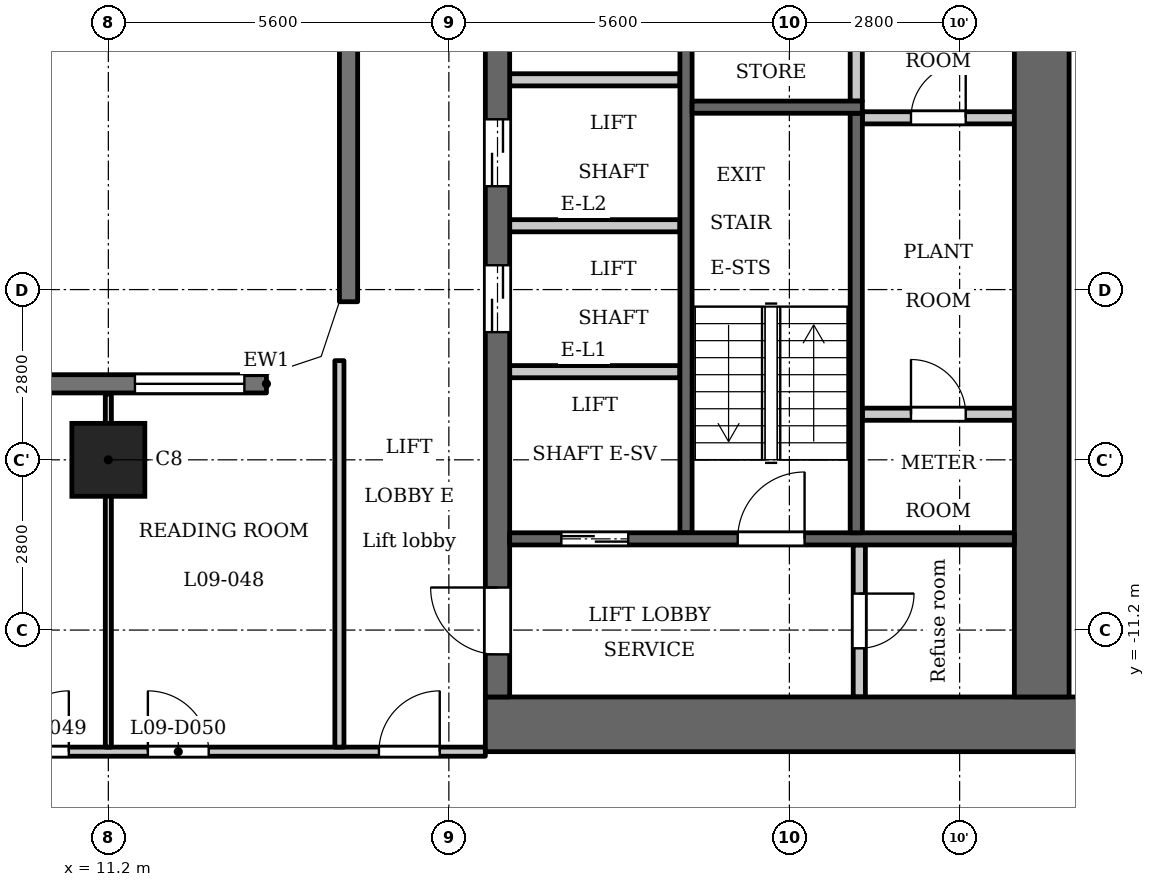
"""IFC4 building model, lengths in metres.
Left out: names, types, materials, properties, quantities, classifications, styles, units other than length and angle.
Written with IfcOpenShell. Run it as: python <this file> out.ifc"""

import sys

from ifc_helpers import new_model, si_unit, direction, frame, frame_2d, origin, origin_2d, place, context, subcontext, project, spatial, polyline, rectangle, outline, extrude, element, fill, save


model = new_model("IFC4")
c1 = context("Model", 3, precision=1e-05, world=origin(), true_north=direction((0.0, 1.0)))
c2 = subcontext(c1, "Body", "Model", "MODEL_VIEW")
j1 = project(units=[si_unit("LENGTHUNIT", "METRE"), si_unit("PLANEANGLEUNIT", "RADIAN")], contexts=[c1])
p1 = place(None, origin())
s1 = spatial("IfcSite", under=j1, at=p1, CompositionType="ELEMENT")
p2 = place(p1, origin())
s2 = spatial("IfcBuilding", under=s1, at=p2, CompositionType="ELEMENT")
p3 = place(p2, frame((0.0, 0.0, 41.0)))
s3 = spatial("IfcBuildingStorey", under=s2, at=p3, CompositionType="ELEMENT", Elevation=41.0)
p4 = place(p3, frame((11.2, -8.4, 0.0), z_axis=(0.0, 0.0, 1.0), x_axis=(1.0, 0.0, 0.0)))
e1 = element("IfcColumn", 1, at=p4, inside=s3, PredefinedType="COLUMN", context=c2, shape_type="SweptSolid", body=[
    extrude(rectangle(XDim=1.2, YDim=1.2, at=origin_2d()), origin(), (0.0, 0.0, 1.0), 3.5),
])
p5 = place(p3, frame((15.15, 5.8, 0.0), z_axis=(0.0, 0.0, 1.0), x_axis=(0.0, -1.0, 0.0)))
e2 = element("IfcWall", 2, at=p5, inside=s3, PredefinedType="SOLIDWALL", context=c2, shape_type="SweptSolid", body=[
    extrude(rectangle(XDim=11.6, YDim=0.3, at=frame_2d((5.8, 0.0))), origin(), (0.0, 0.0, 1.0), 3.2),
])
p6 = place(p3, frame((13.8, -7.15, 0.0), z_axis=(0.0, 0.0, 1.0), x_axis=(-1.0, 0.0, 0.0)))
e3 = element("IfcWall", 3, at=p6, inside=s3, PredefinedType="SOLIDWALL", context=c2, shape_type="SweptSolid", body=[
    extrude(rectangle(XDim=27.6, YDim=0.3, at=frame_2d((13.8, 0.0))), origin(), (0.0, 0.0, 1.0), 3.2),
])
p7 = place(p6, frame((0.363, 0.0, 0.9)))
e4 = element("IfcOpeningElement", 4, at=p7, cuts=e3, PredefinedType="OPENING", context=c2, shape_type="SweptSolid", body=[
    extrude(rectangle(XDim=1.8, YDim=1.25, at=frame_2d((0.9, 0.625))), frame((0.0, 0.16, 0.0), z_axis=(0.0, -1.0, 0.0), x_axis=(1.0, 0.0, 0.0)), (0.0, 0.0, 1.0), 0.32),
])
p8 = place(p6, frame((3.6, 0.0, 1.2)))
e5 = element("IfcOpeningElement", 5, at=p8, cuts=e3, PredefinedType="OPENING", context=c2, shape_type="SweptSolid", body=[
    extrude(rectangle(XDim=3.6, YDim=0.95, at=frame_2d((1.8, 0.475))), frame((0.0, 0.16, 0.0), z_axis=(0.0, -1.0, 0.0), x_axis=(1.0, 0.0, 0.0)), (0.0, 0.0, 1.0), 0.32),
])
p9 = place(p6, frame((9.2, 0.0, 1.2)))
e6 = element("IfcOpeningElement", 6, at=p9, cuts=e3, PredefinedType="OPENING", context=c2, shape_type="SweptSolid", body=[
    extrude(rectangle(XDim=3.6, YDim=0.95, at=frame_2d((1.8, 0.475))), frame((0.0, 0.16, 0.0), z_axis=(0.0, -1.0, 0.0), x_axis=(1.0, 0.0, 0.0)), (0.0, 0.0, 1.0), 0.32),
])
p10 = place(p6, frame((14.8, 0.0, 1.2)))
e7 = element("IfcOpeningElement", 7, at=p10, cuts=e3, PredefinedType="OPENING", context=c2, shape_type="SweptSolid", body=[
    extrude(rectangle(XDim=3.6, YDim=0.95, at=frame_2d((1.8, 0.475))), frame((0.0, 0.16, 0.0), z_axis=(0.0, -1.0, 0.0), x_axis=(1.0, 0.0, 0.0)), (0.0, 0.0, 1.0), 0.32),
])
p11 = place(p6, frame((20.4, 0.0, 1.2)))
e8 = element("IfcOpeningElement", 8, at=p11, cuts=e3, PredefinedType="OPENING", context=c2, shape_type="SweptSolid", body=[
    extrude(rectangle(XDim=3.6, YDim=0.95, at=frame_2d((1.8, 0.475))), frame((0.0, 0.16, 0.0), z_axis=(0.0, -1.0, 0.0), x_axis=(1.0, 0.0, 0.0)), (0.0, 0.0, 1.0), 0.32),
])
p12 = place(p6, frame((25.438, 0.0, 0.9)))
e9 = element("IfcOpeningElement", 9, at=p12, cuts=e3, PredefinedType="OPENING", context=c2, shape_type="SweptSolid", body=[
    extrude(rectangle(XDim=1.8, YDim=1.25, at=frame_2d((0.9, 0.625))), frame((0.0, 0.16, 0.0), z_axis=(0.0, -1.0, 0.0), x_axis=(1.0, 0.0, 0.0)), (0.0, 0.0, 1.0), 0.32),
])
p13 = place(p3, frame((23.5, -2.5, 0.0), z_axis=(0.0, 0.0, 1.0), x_axis=(0.0, 1.0, 0.0)))
e10 = element("IfcWall", 10, at=p13, inside=s3, PredefinedType="PARTITIONING", context=c2, shape_type="SweptSolid", body=[
    extrude(rectangle(XDim=2.65, YDim=0.2, at=frame_2d((1.325, 0.0))), origin(), (0.0, 0.0, 1.0), 3.2),
])
p14 = place(p3, frame((20.7, -9.6, 0.0), z_axis=(0.0, 0.0, 1.0), x_axis=(0.0, 1.0, 0.0)))
e11 = element("IfcWall", 11, at=p14, inside=s3, PredefinedType="SHEAR", context=c2, shape_type="SweptSolid", body=[
    extrude(rectangle(XDim=9.75, YDim=0.2, at=frame_2d((4.875, 0.0))), origin(), (0.0, 0.0, 1.0), 3.2),
])
p15 = place(p3, frame((17.4, -12.75, 0.0), z_axis=(0.0, 0.0, 1.0), x_axis=(1.0, 0.0, 0.0)))
e12 = element("IfcWall", 12, at=p15, inside=s3, PredefinedType="SHEAR", context=c2, shape_type="SweptSolid", body=[
    extrude(rectangle(XDim=10.4, YDim=0.9, at=frame_2d((5.2, 0.0))), origin(), (0.0, 0.0, 1.0), 3.2),
])
p16 = place(p3, frame((17.6, -12.3, 0.0), z_axis=(0.0, 0.0, 1.0), x_axis=(0.0, 1.0, 0.0)))
e13 = element("IfcWall", 13, at=p16, inside=s3, PredefinedType="SHEAR", context=c2, shape_type="SweptSolid", body=[
    extrude(rectangle(XDim=24.6, YDim=0.4, at=frame_2d((12.3, 0.0))), origin(), (0.0, 0.0, 1.0), 3.2),
])
p17 = place(p16, frame((6.0, 0.0, 0.0)))
e14 = element("IfcOpeningElement", 14, at=p17, cuts=e13, PredefinedType="OPENING", context=c2, shape_type="SweptSolid", body=[
    extrude(rectangle(XDim=1.1, YDim=2.1, at=frame_2d((0.55, 1.05))), frame((0.0, 0.21, 0.0), z_axis=(0.0, -1.0, 0.0), x_axis=(1.0, 0.0, 0.0)), (0.0, 0.0, 1.0), 0.42),
])
p18 = place(p16, frame((8.4, 0.0, 0.0)))
e15 = element("IfcOpeningElement", 15, at=p18, cuts=e13, PredefinedType="OPENING", context=c2, shape_type="SweptSolid", body=[
    extrude(rectangle(XDim=1.1, YDim=2.1, at=frame_2d((0.55, 1.05))), frame((0.0, 0.21, 0.0), z_axis=(0.0, -1.0, 0.0), x_axis=(1.0, 0.0, 0.0)), (0.0, 0.0, 1.0), 0.42),
])
p19 = place(p16, frame((10.8, 0.0, 0.0)))
e16 = element("IfcOpeningElement", 16, at=p19, cuts=e13, PredefinedType="OPENING", context=c2, shape_type="SweptSolid", body=[
    extrude(rectangle(XDim=1.1, YDim=2.1, at=frame_2d((0.55, 1.05))), frame((0.0, 0.21, 0.0), z_axis=(0.0, -1.0, 0.0), x_axis=(1.0, 0.0, 0.0)), (0.0, 0.0, 1.0), 0.42),
])
p20 = place(p16, frame((16.75, 0.0, 0.0)))
e17 = element("IfcOpeningElement", 17, at=p20, cuts=e13, PredefinedType="OPENING", context=c2, shape_type="SweptSolid", body=[
    extrude(rectangle(XDim=0.9, YDim=2.1, at=frame_2d((0.45, 1.05))), frame((0.0, 0.21, 0.0), z_axis=(0.0, -1.0, 0.0), x_axis=(1.0, 0.0, 0.0)), (0.0, 0.0, 1.0), 0.42),
])
p21 = place(p16, frame((22.8, 0.0, 0.0)))
e18 = element("IfcOpeningElement", 18, at=p21, cuts=e13, PredefinedType="OPENING", context=c2, shape_type="SweptSolid", body=[
    extrude(rectangle(XDim=1.1, YDim=2.1, at=frame_2d((0.55, 1.05))), frame((0.0, 0.21, 0.0), z_axis=(0.0, -1.0, 0.0), x_axis=(1.0, 0.0, 0.0)), (0.0, 0.0, 1.0), 0.42),
])
p22 = place(p16, frame((0.7, 0.0, 0.0)))
e19 = element("IfcOpeningElement", 19, at=p22, cuts=e13, PredefinedType="OPENING", context=c2, shape_type="SweptSolid", body=[
    extrude(rectangle(XDim=1.1, YDim=2.1, at=frame_2d((0.55, 1.05))), frame((0.0, 0.21, 0.0), z_axis=(0.0, -1.0, 0.0), x_axis=(1.0, 0.0, 0.0)), (0.0, 0.0, 1.0), 0.42),
])
p23 = place(p16, frame((12.775, 0.0, 0.0)))
e20 = element("IfcOpeningElement", 20, at=p23, cuts=e13, PredefinedType="OPENING", context=c2, shape_type="SweptSolid", body=[
    extrude(rectangle(XDim=1.8, YDim=2.1, at=frame_2d((0.9, 1.05))), frame((0.0, 0.21, 0.0), z_axis=(0.0, -1.0, 0.0), x_axis=(1.0, 0.0, 0.0)), (0.0, 0.0, 1.0), 0.42),
])
p24 = place(p3, frame((26.55, -12.3, 0.0), z_axis=(0.0, 0.0, 1.0), x_axis=(0.0, 1.0, 0.0)))
e21 = element("IfcWall", 21, at=p24, inside=s3, PredefinedType="SHEAR", context=c2, shape_type="SweptSolid", body=[
    extrude(rectangle(XDim=24.6, YDim=0.9, at=frame_2d((12.3, 0.0))), origin(), (0.0, 0.0, 1.0), 3.2),
])
p25 = place(p3, frame((23.55, -12.3, 0.0), z_axis=(0.0, 0.0, 1.0), x_axis=(0.0, 1.0, 0.0)))
e22 = element("IfcWall", 22, at=p25, inside=s3, PredefinedType="PARTITIONING", context=c2, shape_type="SweptSolid", body=[
    extrude(rectangle(XDim=2.5, YDim=0.2, at=frame_2d((1.25, 0.0))), origin(), (0.0, 0.0, 1.0), 3.2),
])
p26 = place(p25, frame((0.8, 0.0, 0.0)))
e23 = element("IfcOpeningElement", 23, at=p26, cuts=e22, PredefinedType="OPENING", context=c2, shape_type="SweptSolid", body=[
    extrude(rectangle(XDim=0.9, YDim=2.1, at=frame_2d((0.45, 1.05))), frame((0.0, 0.11, 0.0), z_axis=(0.0, -1.0, 0.0), x_axis=(1.0, 0.0, 0.0)), (0.0, 0.0, 1.0), 0.22),
])
p27 = place(p3, frame((23.6, -7.65, 0.0), z_axis=(0.0, 0.0, 1.0), x_axis=(1.0, 0.0, 0.0)))
e24 = element("IfcWall", 24, at=p27, inside=s3, PredefinedType="PARTITIONING", context=c2, shape_type="SweptSolid", body=[
    extrude(rectangle(XDim=2.5, YDim=0.2, at=frame_2d((1.25, 0.0))), origin(), (0.0, 0.0, 1.0), 3.2),
])
p28 = place(p27, frame((0.8, 0.0, 0.0)))
e25 = element("IfcOpeningElement", 25, at=p28, cuts=e24, PredefinedType="OPENING", context=c2, shape_type="SweptSolid", body=[
    extrude(rectangle(XDim=0.9, YDim=2.1, at=frame_2d((0.45, 1.05))), frame((0.0, 0.11, 0.0), z_axis=(0.0, -1.0, 0.0), x_axis=(1.0, 0.0, 0.0)), (0.0, 0.0, 1.0), 0.22),
])
p29 = place(p3, frame((23.6, -2.775, 0.0), z_axis=(0.0, 0.0, 1.0), x_axis=(1.0, 0.0, 0.0)))
e26 = element("IfcWall", 26, at=p29, inside=s3, PredefinedType="PARTITIONING", context=c2, shape_type="SweptSolid", body=[
    extrude(rectangle(XDim=2.5, YDim=0.2, at=frame_2d((1.25, 0.0))), origin(), (0.0, 0.0, 1.0), 3.2),
])
p30 = place(p29, frame((0.8, 0.0, 0.0)))
e27 = element("IfcOpeningElement", 27, at=p30, cuts=e26, PredefinedType="OPENING", context=c2, shape_type="SweptSolid", body=[
    extrude(rectangle(XDim=0.9, YDim=2.1, at=frame_2d((0.45, 1.05))), frame((0.0, 0.11, 0.0), z_axis=(0.0, -1.0, 0.0), x_axis=(1.0, 0.0, 0.0)), (0.0, 0.0, 1.0), 0.22),
])
p31 = place(p3, frame((17.8, -9.7, 0.0), z_axis=(0.0, 0.0, 1.0), x_axis=(1.0, 0.0, 0.0)))
e28 = element("IfcWall", 28, at=p31, inside=s3, PredefinedType="SHEAR", context=c2, shape_type="SweptSolid", body=[
    extrude(rectangle(XDim=8.3, YDim=0.2, at=frame_2d((4.15, 0.0))), origin(), (0.0, 0.0, 1.0), 3.2),
])
p32 = place(p31, frame((0.85, 0.0, 0.0)))
e29 = element("IfcOpeningElement", 29, at=p32, cuts=e28, PredefinedType="OPENING", context=c2, shape_type="SweptSolid", body=[
    extrude(rectangle(XDim=1.1, YDim=2.1, at=frame_2d((0.55, 1.05))), frame((0.0, 0.11, 0.0), z_axis=(0.0, -1.0, 0.0), x_axis=(1.0, 0.0, 0.0)), (0.0, 0.0, 1.0), 0.22),
])
p33 = place(p31, frame((3.75, 0.0, 0.0)))
e30 = element("IfcOpeningElement", 30, at=p33, cuts=e28, PredefinedType="OPENING", context=c2, shape_type="SweptSolid", body=[
    extrude(rectangle(XDim=1.1, YDim=2.1, at=frame_2d((0.55, 1.05))), frame((0.0, 0.11, 0.0), z_axis=(0.0, -1.0, 0.0), x_axis=(1.0, 0.0, 0.0)), (0.0, 0.0, 1.0), 0.22),
])
for number, where, z_axis, x_axis in (
    (31, (17.8, -6.95, 0.0), (0.0, 0.0, 1.0), (1.0, 0.0, 0.0)),
    (32, (17.8, -4.55, 0.0), (0.0, 0.0, 1.0), (1.0, 0.0, 0.0)),
    (33, (17.8, -2.15, 0.0), (0.0, 0.0, 1.0), (1.0, 0.0, 0.0)),
):
    element("IfcWall", number, at=place(p3, frame(where, z_axis=z_axis, x_axis=x_axis)), inside=s3, PredefinedType="PARTITIONING", context=c2, shape_type="SweptSolid", body=[
        extrude(rectangle(XDim=2.8, YDim=0.2, at=frame_2d((1.4, 0.0))), origin(), (0.0, 0.0, 1.0), 3.2),
    ])
p34 = place(p3, frame((23.5, -9.6, 0.0), z_axis=(0.0, 0.0, 1.0), x_axis=(0.0, 1.0, 0.0)))
e34 = element("IfcWall", 34, at=p34, inside=s3, PredefinedType="SHEAR", context=c2, shape_type="SweptSolid", body=[
    extrude(rectangle(XDim=6.9, YDim=0.2, at=frame_2d((3.45, 0.0))), origin(), (0.0, 0.0, 1.0), 3.2),
])
p35 = place(p3, frame((20.8, -2.6, 0.0), z_axis=(0.0, 0.0, 1.0), x_axis=(1.0, 0.0, 0.0)))
e35 = element("IfcWall", 35, at=p35, inside=s3, PredefinedType="SHEAR", context=c2, shape_type="SweptSolid", body=[
    extrude(rectangle(XDim=2.8, YDim=0.2, at=frame_2d((1.4, 0.0))), origin(), (0.0, 0.0, 1.0), 3.2),
])
p36 = place(p3, frame((-17.4, -13.2, 0.0), z_axis=(0.0, 0.0, 1.0), x_axis=(1.0, 0.0, 0.0)))
e36 = element("IfcWall", 36, at=p36, inside=s3, PredefinedType="PARTITIONING", context=c2, shape_type="SweptSolid", body=[
    extrude(rectangle(XDim=34.8, YDim=0.15, at=frame_2d((17.4, 0.0))), origin(), (0.0, 0.0, 1.0), 3.2),
])
p37 = place(p36, frame((0.65, 0.0, 0.0)))
e37 = element("IfcOpeningElement", 37, at=p37, cuts=e36, PredefinedType="OPENING", context=c2, shape_type="SweptSolid", body=[
    extrude(rectangle(XDim=1.0, YDim=2.1, at=frame_2d((0.5, 1.05))), frame((0.0, 0.085, 0.0), z_axis=(0.0, -1.0, 0.0), x_axis=(1.0, 0.0, 0.0)), (0.0, 0.0, 1.0), 0.17),
])
p38 = place(p36, frame((33.05, 0.0, 0.0)))
e38 = element("IfcOpeningElement", 38, at=p38, cuts=e36, PredefinedType="OPENING", context=c2, shape_type="SweptSolid", body=[
    extrude(rectangle(XDim=1.0, YDim=2.1, at=frame_2d((0.5, 1.05))), frame((0.0, 0.085, 0.0), z_axis=(0.0, -1.0, 0.0), x_axis=(1.0, 0.0, 0.0)), (0.0, 0.0, 1.0), 0.17),
])
p39 = place(p36, frame((4.55, 0.0, 0.0)))
e39 = element("IfcOpeningElement", 39, at=p39, cuts=e36, PredefinedType="OPENING", context=c2, shape_type="SweptSolid", body=[
    extrude(rectangle(XDim=1.0, YDim=2.1, at=frame_2d((0.5, 1.05))), frame((0.0, 0.085, 0.0), z_axis=(0.0, -1.0, 0.0), x_axis=(1.0, 0.0, 0.0)), (0.0, 0.0, 1.0), 0.17),
])
p40 = place(p36, frame((6.9, 0.0, 0.0)))
e40 = element("IfcOpeningElement", 40, at=p40, cuts=e36, PredefinedType="OPENING", context=c2, shape_type="SweptSolid", body=[
    extrude(rectangle(XDim=1.0, YDim=2.1, at=frame_2d((0.5, 1.05))), frame((0.0, 0.085, 0.0), z_axis=(0.0, -1.0, 0.0), x_axis=(1.0, 0.0, 0.0)), (0.0, 0.0, 1.0), 0.17),
])
p41 = place(p36, frame((15.75, 0.0, 0.0)))
e41 = element("IfcOpeningElement", 41, at=p41, cuts=e36, PredefinedType="OPENING", context=c2, shape_type="SweptSolid", body=[
    extrude(rectangle(XDim=1.0, YDim=2.1, at=frame_2d((0.5, 1.05))), frame((0.0, 0.085, 0.0), z_axis=(0.0, -1.0, 0.0), x_axis=(1.0, 0.0, 0.0)), (0.0, 0.0, 1.0), 0.17),
])
p42 = place(p36, frame((18.1, 0.0, 0.0)))
e42 = element("IfcOpeningElement", 42, at=p42, cuts=e36, PredefinedType="OPENING", context=c2, shape_type="SweptSolid", body=[
    extrude(rectangle(XDim=1.0, YDim=2.1, at=frame_2d((0.5, 1.05))), frame((0.0, 0.085, 0.0), z_axis=(0.0, -1.0, 0.0), x_axis=(1.0, 0.0, 0.0)), (0.0, 0.0, 1.0), 0.17),
])
p43 = place(p36, frame((26.95, 0.0, 0.0)))
e43 = element("IfcOpeningElement", 43, at=p43, cuts=e36, PredefinedType="OPENING", context=c2, shape_type="SweptSolid", body=[
    extrude(rectangle(XDim=1.0, YDim=2.1, at=frame_2d((0.5, 1.05))), frame((0.0, 0.085, 0.0), z_axis=(0.0, -1.0, 0.0), x_axis=(1.0, 0.0, 0.0)), (0.0, 0.0, 1.0), 0.17),
])
p44 = place(p36, frame((29.25, 0.0, 0.0)))
e44 = element("IfcOpeningElement", 44, at=p44, cuts=e36, PredefinedType="OPENING", context=c2, shape_type="SweptSolid", body=[
    extrude(rectangle(XDim=1.0, YDim=2.1, at=frame_2d((0.5, 1.05))), frame((0.0, 0.085, 0.0), z_axis=(0.0, -1.0, 0.0), x_axis=(1.0, 0.0, 0.0)), (0.0, 0.0, 1.0), 0.17),
])
p45 = place(p3, frame((11.2, -13.125, 0.0), z_axis=(0.0, 0.0, 1.0), x_axis=(0.0, 1.0, 0.0)))
e45 = element("IfcWall", 45, at=p45, inside=s3, PredefinedType="PARTITIONING", context=c2, shape_type="SweptSolid", body=[
    extrude(rectangle(XDim=5.805, YDim=0.1, at=frame_2d((2.902, 0.0))), origin(), (0.0, 0.0, 1.0), 3.2),
])
p46 = place(p3, frame((15.0, -13.125, 0.0), z_axis=(0.0, 0.0, 1.0), x_axis=(0.0, 1.0, 0.0)))
e46 = element("IfcWall", 46, at=p46, inside=s3, PredefinedType="PARTITIONING", context=c2, shape_type="SweptSolid", body=[
    extrude(rectangle(XDim=6.356, YDim=0.15, at=frame_2d((3.178, 0.0))), origin(), (0.0, 0.0, 1.0), 3.2),
])
p47 = place(p3, origin())
e47 = element("IfcWall", 47, at=p47, inside=s3, PredefinedType="SOLIDWALL", context=c2, shape_type="SweptSolid", body=[
    extrude(outline(polyline([(14.937, -6.937), (15.3, -5.849), (15.3, -5.8), (15.0, -5.8), (14.7, -6.7), (13.8, -7.0), (13.8, -7.3), (13.849, -7.3), (14.937, -6.937)])), origin(), (0.0, 0.0, 1.0), 3.2),
])
p48 = place(p32, origin())
e48 = element("IfcDoor", 48, at=p48, inside=s3, OperationType="DOUBLE_DOOR_SLIDING", PredefinedType="DOOR", context=c2, shape_type="SweptSolid", body=[
    extrude(rectangle(XDim=1.1, YDim=2.1, at=frame_2d((0.55, 1.05))), frame((0.0, 0.025, 0.0), z_axis=(0.0, -1.0, 0.0), x_axis=(1.0, 0.0, 0.0)), (0.0, 0.0, 1.0), 0.05),
])
fill(e29, e48)
p49 = place(p17, origin())
e49 = element("IfcDoor", 49, at=p49, inside=s3, OperationType="DOUBLE_DOOR_SLIDING", PredefinedType="DOOR", context=c2, shape_type="SweptSolid", body=[
    extrude(rectangle(XDim=1.1, YDim=2.1, at=frame_2d((0.55, 1.05))), frame((0.0, 0.025, 0.0), z_axis=(0.0, -1.0, 0.0), x_axis=(1.0, 0.0, 0.0)), (0.0, 0.0, 1.0), 0.05),
])
fill(e14, e49)
p50 = place(p18, origin())
e50 = element("IfcDoor", 50, at=p50, inside=s3, OperationType="DOUBLE_DOOR_SLIDING", PredefinedType="DOOR", context=c2, shape_type="SweptSolid", body=[
    extrude(rectangle(XDim=1.1, YDim=2.1, at=frame_2d((0.55, 1.05))), frame((0.0, 0.025, 0.0), z_axis=(0.0, -1.0, 0.0), x_axis=(1.0, 0.0, 0.0)), (0.0, 0.0, 1.0), 0.05),
])
fill(e15, e50)
p51 = place(p22, origin())
e51 = element("IfcDoor", 51, at=p51, inside=s3, OperationType="SINGLE_SWING_LEFT", PredefinedType="DOOR", context=c2, shape_type="SweptSolid", body=[
    extrude(rectangle(XDim=1.1, YDim=2.1, at=frame_2d((0.55, 1.05))), frame((0.0, 0.025, 0.0), z_axis=(0.0, -1.0, 0.0), x_axis=(1.0, 0.0, 0.0)), (0.0, 0.0, 1.0), 0.05),
])
fill(e19, e51)
p52 = place(p26, origin())
e52 = element("IfcDoor", 52, at=p52, inside=s3, OperationType="SINGLE_SWING_RIGHT", PredefinedType="DOOR", context=c2, shape_type="SweptSolid", body=[
    extrude(rectangle(XDim=0.9, YDim=2.1, at=frame_2d((0.45, 1.05))), frame((0.0, 0.025, 0.0), z_axis=(0.0, -1.0, 0.0), x_axis=(1.0, 0.0, 0.0)), (0.0, 0.0, 1.0), 0.05),
])
fill(e23, e52)
p53 = place(p33, origin())
e53 = element("IfcDoor", 53, at=p53, inside=s3, OperationType="SINGLE_SWING_LEFT", PredefinedType="DOOR", context=c2, shape_type="SweptSolid", body=[
    extrude(rectangle(XDim=1.1, YDim=2.1, at=frame_2d((0.55, 1.05))), frame((0.0, 0.025, 0.0), z_axis=(0.0, -1.0, 0.0), x_axis=(1.0, 0.0, 0.0)), (0.0, 0.0, 1.0), 0.05),
])
fill(e30, e53)
p54 = place(p28, origin())
e54 = element("IfcDoor", 54, at=p54, inside=s3, OperationType="SINGLE_SWING_RIGHT", PredefinedType="DOOR", context=c2, shape_type="SweptSolid", body=[
    extrude(rectangle(XDim=0.9, YDim=2.1, at=frame_2d((0.45, 1.05))), frame((0.0, 0.025, 0.0), z_axis=(0.0, -1.0, 0.0), x_axis=(1.0, 0.0, 0.0)), (0.0, 0.0, 1.0), 0.05),
])
fill(e25, e54)
p55 = place(p30, origin())
e55 = element("IfcDoor", 55, at=p55, inside=s3, OperationType="SINGLE_SWING_LEFT", PredefinedType="DOOR", context=c2, shape_type="SweptSolid", body=[
    extrude(rectangle(XDim=0.9, YDim=2.1, at=frame_2d((0.45, 1.05))), frame((0.0, 0.025, 0.0), z_axis=(0.0, -1.0, 0.0), x_axis=(1.0, 0.0, 0.0)), (0.0, 0.0, 1.0), 0.05),
])
fill(e27, e55)
p56 = place(p38, origin())
e56 = element("IfcDoor", 56, at=p56, inside=s3, OperationType="SINGLE_SWING_LEFT", PredefinedType="DOOR", context=c2, shape_type="SweptSolid", body=[
    extrude(rectangle(XDim=1.0, YDim=2.1, at=frame_2d((0.5, 1.05))), frame((0.0, 0.025, 0.0), z_axis=(0.0, -1.0, 0.0), x_axis=(1.0, 0.0, 0.0)), (0.0, 0.0, 1.0), 0.05),
])
fill(e38, e56)
p57 = place(p43, origin())
e57 = element("IfcDoor", 57, at=p57, inside=s3, OperationType="SINGLE_SWING_LEFT", PredefinedType="DOOR", context=c2, shape_type="SweptSolid", body=[
    extrude(rectangle(XDim=1.0, YDim=2.1, at=frame_2d((0.5, 1.05))), frame((0.0, 0.025, 0.0), z_axis=(0.0, -1.0, 0.0), x_axis=(1.0, 0.0, 0.0)), (0.0, 0.0, 1.0), 0.05),
])
fill(e43, e57)
p58 = place(p44, origin())
e58 = element("IfcDoor", 58, at=p58, inside=s3, OperationType="SINGLE_SWING_RIGHT", PredefinedType="DOOR", context=c2, shape_type="SweptSolid", body=[
    extrude(rectangle(XDim=1.0, YDim=2.1, at=frame_2d((0.5, 1.05))), frame((0.0, 0.025, 0.0), z_axis=(0.0, -1.0, 0.0), x_axis=(1.0, 0.0, 0.0)), (0.0, 0.0, 1.0), 0.05),
])
fill(e44, e58)
p59 = place(p7, origin())
e59 = element("IfcWindow", 59, at=p59, inside=s3, PartitioningType="SINGLE_PANEL", PredefinedType="WINDOW", context=c2, shape_type="SweptSolid", body=[
    extrude(rectangle(XDim=1.8, YDim=1.25, at=frame_2d((0.9, 0.625))), frame((0.0, 0.03, 0.0), z_axis=(0.0, -1.0, 0.0), x_axis=(1.0, 0.0, 0.0)), (0.0, 0.0, 1.0), 0.06),
])
fill(e4, e59)
save(model, sys.argv[1])
